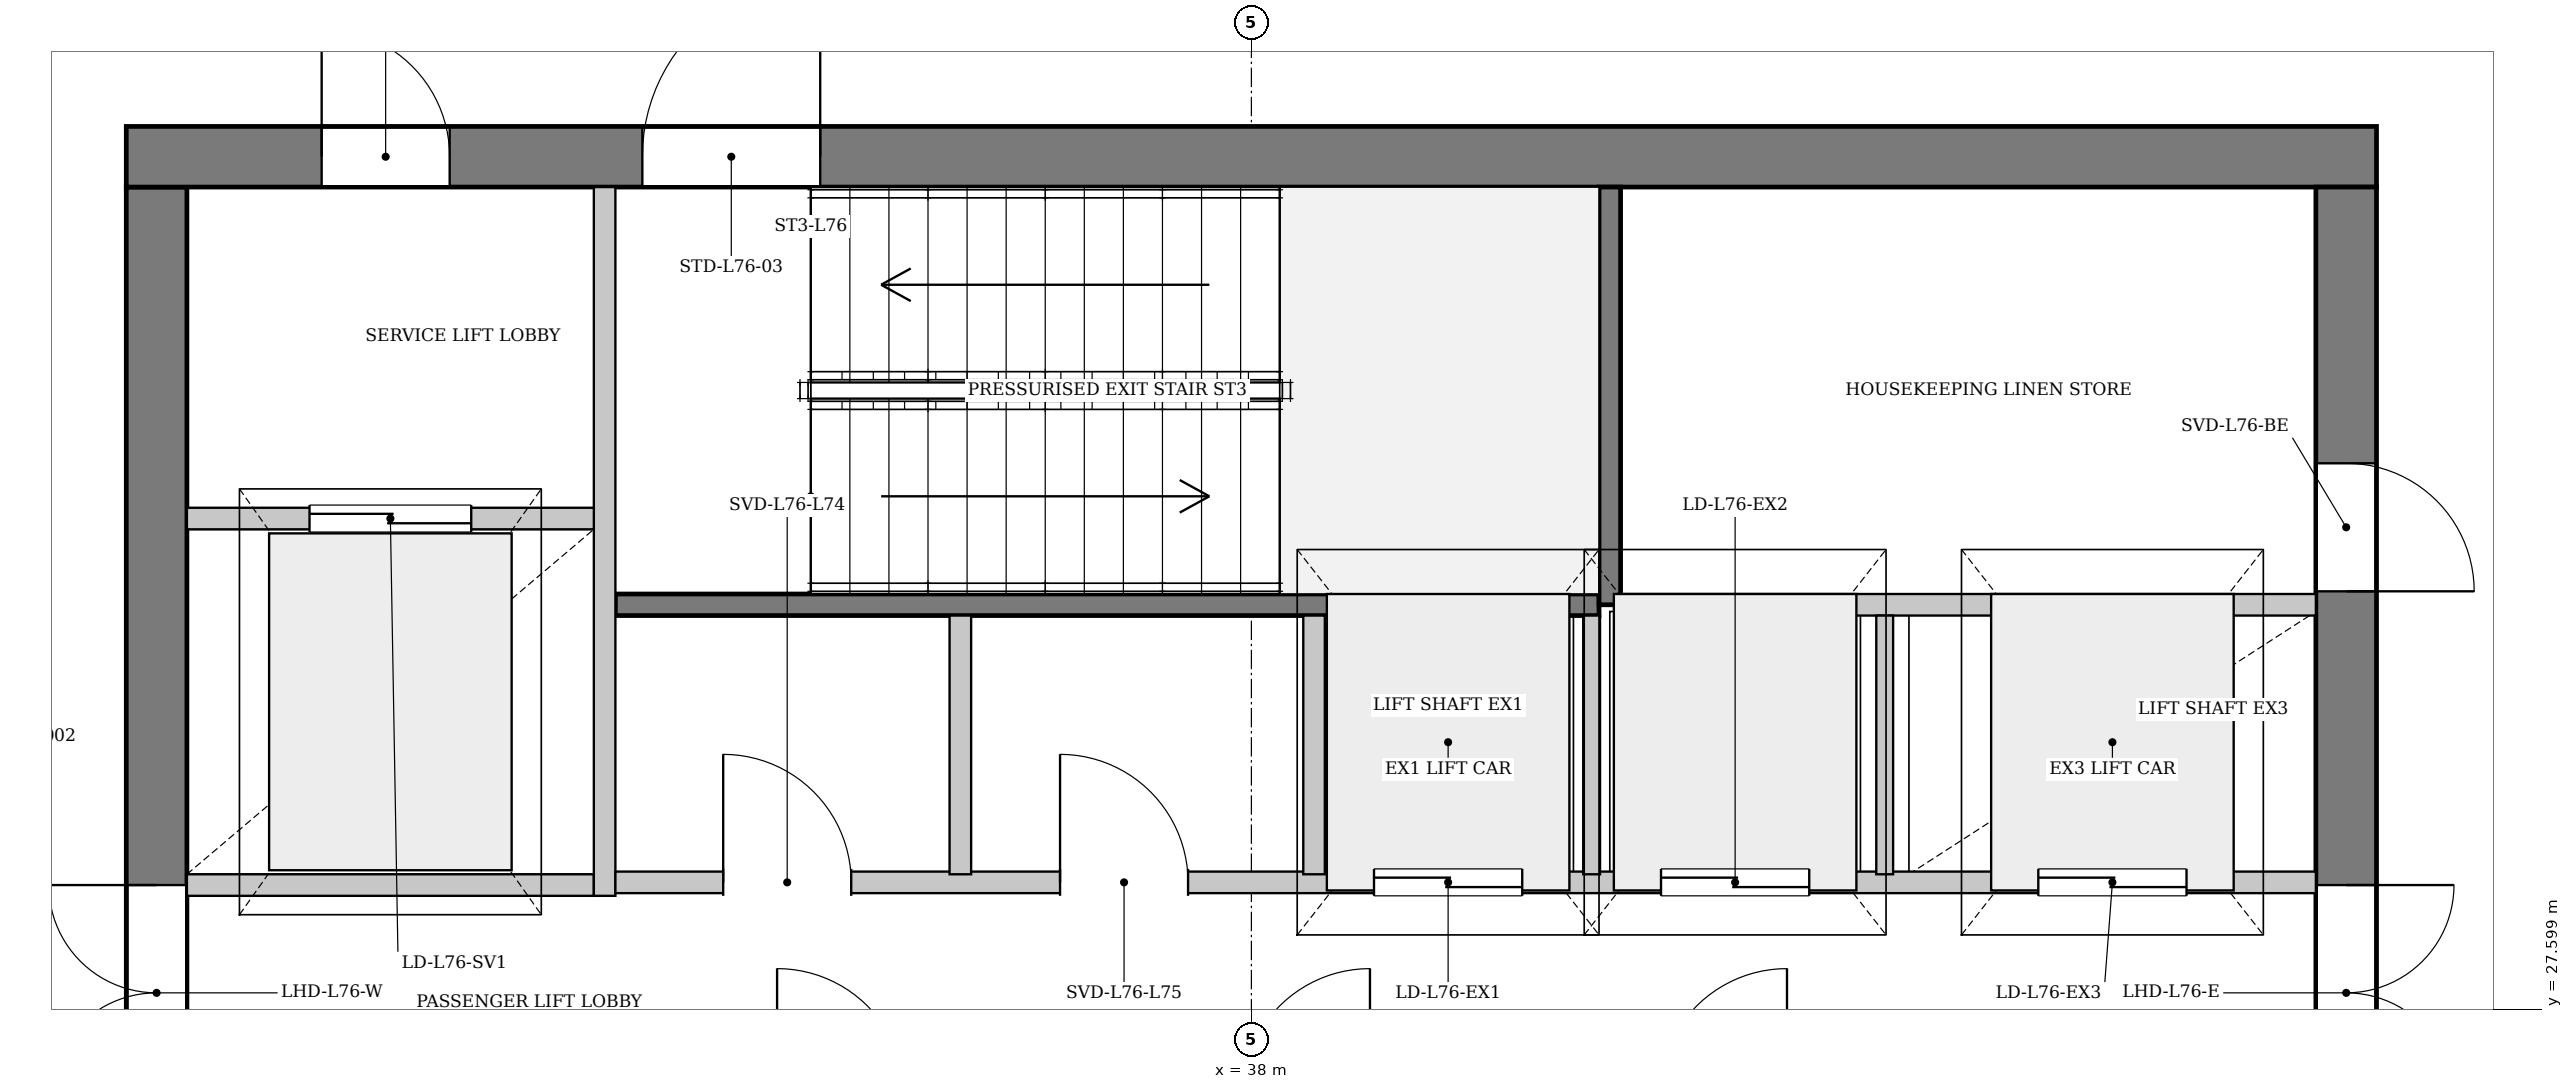
"""IFC4 building model, lengths in metres.
Left out: names, types, materials, properties, quantities, classifications, styles, units other than length and angle.
Written with IfcOpenShell. Run it as: python <this file> out.ifc"""

import sys

from ifc_helpers import new_model, si_unit, direction, frame, frame_2d, origin, place, context, subcontext, project, spatial, rectangle, extrude, source, transform, mapped, element, fill, save


model = new_model("IFC4")
c1 = context("Model", 3, precision=1e-05, world=origin(), true_north=direction((0.0, 1.0)))
c2 = subcontext(c1, "Body", "Model", "MODEL_VIEW")
j1 = project(units=[si_unit("LENGTHUNIT", "METRE"), si_unit("PLANEANGLEUNIT", "RADIAN")], contexts=[c1])
p1 = place(None, origin())
s1 = spatial("IfcSite", under=j1, at=p1, CompositionType="ELEMENT")
p2 = place(p1, origin())
s2 = spatial("IfcBuilding", under=s1, at=p2, CompositionType="ELEMENT")
p3 = place(p2, frame((0.0, 0.0, 286.1)))
s3 = spatial("IfcBuildingStorey", under=s2, at=p3, CompositionType="ELEMENT", Elevation=286.1)
p4 = place(p3, frame((29.875, 19.5, 0.0), z_axis=(0.0, 0.0, 1.0), x_axis=(0.0, 1.0, 0.0)))
e1 = element("IfcWall", 1, at=p4, inside=s3, PredefinedType="SHEAR", context=c2, shape_type="SweptSolid", body=[
    extrude(rectangle(XDim=14.2, YDim=0.45, at=frame_2d((7.1, 0.0))), origin(), (0.0, 0.0, 1.0), 4.12),
])
p5 = place(p4, frame((7.42, 0.0, 0.0)))
e2 = element("IfcOpeningElement", 2, at=p5, cuts=e1, PredefinedType="OPENING", context=c2, shape_type="SweptSolid", body=[
    extrude(rectangle(XDim=1.6, YDim=2.2, at=frame_2d((0.8, 1.1))), frame((0.0, 0.235, 0.0), z_axis=(0.0, -1.0, 0.0), x_axis=(1.0, 0.0, 0.0)), (0.0, 0.0, 1.0), 0.47),
])
p6 = place(p3, frame((29.65, 33.925, 0.0), z_axis=(0.0, 0.0, 1.0), x_axis=(1.0, 0.0, 0.0)))
e3 = element("IfcWall", 3, at=p6, inside=s3, PredefinedType="SHEAR", context=c2, shape_type="SweptSolid", body=[
    extrude(rectangle(XDim=16.7, YDim=0.45, at=frame_2d((8.35, 0.0))), origin(), (0.0, 0.0, 1.0), 4.12),
])
p7 = place(p6, frame((1.45, 0.0, 0.0)))
e4 = element("IfcOpeningElement", 4, at=p7, cuts=e3, PredefinedType="OPENING", context=c2, shape_type="SweptSolid", body=[
    extrude(rectangle(XDim=0.95, YDim=2.1, at=frame_2d((0.475, 1.05))), frame((0.0, 0.235, 0.0), z_axis=(0.0, -1.0, 0.0), x_axis=(1.0, 0.0, 0.0)), (0.0, 0.0, 1.0), 0.47),
])
p8 = place(p6, frame((3.83, 0.0, 0.0)))
e5 = element("IfcOpeningElement", 5, at=p8, cuts=e3, PredefinedType="OPENING", context=c2, shape_type="SweptSolid", body=[
    extrude(rectangle(XDim=1.32, YDim=2.2, at=frame_2d((0.66, 1.1))), frame((0.0, 0.235, 0.0), z_axis=(0.0, -1.0, 0.0), x_axis=(1.0, 0.0, 0.0)), (0.0, 0.0, 1.0), 0.47),
])
p9 = place(p3, frame((46.125, 33.7, 0.0), z_axis=(0.0, 0.0, 1.0), x_axis=(0.0, -1.0, 0.0)))
e6 = element("IfcWall", 6, at=p9, inside=s3, PredefinedType="SHEAR", context=c2, shape_type="SweptSolid", body=[
    extrude(rectangle(XDim=14.2, YDim=0.45, at=frame_2d((7.1, 0.0))), origin(), (0.0, 0.0, 1.0), 4.12),
])
p10 = place(p9, frame((5.18, 0.0, 0.0)))
e7 = element("IfcOpeningElement", 7, at=p10, cuts=e6, PredefinedType="OPENING", context=c2, shape_type="SweptSolid", body=[
    extrude(rectangle(XDim=1.6, YDim=2.2, at=frame_2d((0.8, 1.1))), frame((0.0, 0.235, 0.0), z_axis=(0.0, -1.0, 0.0), x_axis=(1.0, 0.0, 0.0)), (0.0, 0.0, 1.0), 0.47),
])
p11 = place(p9, frame((2.05, 0.0, 0.0)))
e8 = element("IfcOpeningElement", 8, at=p11, cuts=e6, PredefinedType="OPENING", context=c2, shape_type="SweptSolid", body=[
    extrude(rectangle(XDim=0.95, YDim=2.1, at=frame_2d((0.475, 1.05))), frame((0.0, 0.235, 0.0), z_axis=(0.0, -1.0, 0.0), x_axis=(1.0, 0.0, 0.0)), (0.0, 0.0, 1.0), 0.47),
])
p12 = place(p3, frame((33.28, 30.6, 0.0), z_axis=(0.0, 0.0, 1.0), x_axis=(1.0, 0.0, 0.0)))
e9 = element("IfcWall", 9, at=p12, inside=s3, PredefinedType="PARTITIONING", context=c2, shape_type="SweptSolid", body=[
    extrude(rectangle(XDim=7.3, YDim=0.16, at=frame_2d((3.65, 0.0))), origin(), (0.0, 0.0, 1.0), 4.12),
])
p13 = place(p3, frame((40.66, 30.6, 0.0), z_axis=(0.0, 0.0, 1.0), x_axis=(0.0, 1.0, 0.0)))
e10 = element("IfcWall", 10, at=p13, inside=s3, PredefinedType="PARTITIONING", context=c2, shape_type="SweptSolid", body=[
    extrude(rectangle(XDim=3.1, YDim=0.16, at=frame_2d((1.55, 0.0))), origin(), (0.0, 0.0, 1.0), 4.12),
])
p14 = place(p3, frame((30.1, 28.52, 0.0), z_axis=(0.0, 0.0, 1.0), x_axis=(1.0, 0.0, 0.0)))
e11 = element("IfcWall", 11, at=p14, inside=s3, PredefinedType="PARTITIONING", context=c2, shape_type="SweptSolid", body=[
    extrude(rectangle(XDim=3.02, YDim=0.16, at=frame_2d((1.51, 0.0))), origin(), (0.0, 0.0, 1.0), 4.12),
])
p15 = place(p3, frame((33.2, 28.44, 0.0), z_axis=(0.0, 0.0, 1.0), x_axis=(0.0, 1.0, 0.0)))
e12 = element("IfcWall", 12, at=p15, inside=s3, PredefinedType="PARTITIONING", context=c2, shape_type="SweptSolid", body=[
    extrude(rectangle(XDim=5.26, YDim=0.16, at=frame_2d((2.63, 0.0))), origin(), (0.0, 0.0, 1.0), 4.12),
])
p16 = place(p3, frame((30.1, 31.24, 0.0), z_axis=(0.0, 0.0, 1.0), x_axis=(1.0, 0.0, 0.0)))
e13 = element("IfcWall", 13, at=p16, inside=s3, PredefinedType="PARTITIONING", context=c2, shape_type="SweptSolid", body=[
    extrude(rectangle(XDim=3.02, YDim=0.16, at=frame_2d((1.51, 0.0))), origin(), (0.0, 0.0, 1.0), 4.12),
])
p17 = place(p16, frame((0.91, 0.0, 0.0)))
e14 = element("IfcOpeningElement", 14, at=p17, cuts=e13, PredefinedType="OPENING", context=c2, shape_type="SweptSolid", body=[
    extrude(rectangle(XDim=1.2, YDim=2.2, at=frame_2d((0.6, 1.1))), frame((0.0, 0.09, 0.0), z_axis=(0.0, -1.0, 0.0), x_axis=(1.0, 0.0, 0.0)), (0.0, 0.0, 1.0), 0.18),
])
p18 = place(p3, frame((33.28, 28.54, 0.0), z_axis=(0.0, 0.0, 1.0), x_axis=(1.0, 0.0, 0.0)))
e15 = element("IfcWall", 15, at=p18, inside=s3, PredefinedType="PARTITIONING", context=c2, shape_type="SweptSolid", body=[
    extrude(rectangle(XDim=12.62, YDim=0.16, at=frame_2d((6.31, 0.0))), origin(), (0.0, 0.0, 1.0), 4.12),
])
p19 = place(p18, frame((0.8, 0.0, 0.0)))
e16 = element("IfcOpeningElement", 16, at=p19, cuts=e15, PredefinedType="OPENING", context=c2, shape_type="SweptSolid", body=[
    extrude(rectangle(XDim=0.95, YDim=2.1, at=frame_2d((0.475, 1.05))), frame((0.0, 0.09, 0.0), z_axis=(0.0, -1.0, 0.0), x_axis=(1.0, 0.0, 0.0)), (0.0, 0.0, 1.0), 0.18),
])
p20 = place(p18, frame((3.3, 0.0, 0.0)))
e17 = element("IfcOpeningElement", 17, at=p20, cuts=e15, PredefinedType="OPENING", context=c2, shape_type="SweptSolid", body=[
    extrude(rectangle(XDim=0.95, YDim=2.1, at=frame_2d((0.475, 1.05))), frame((0.0, 0.09, 0.0), z_axis=(0.0, -1.0, 0.0), x_axis=(1.0, 0.0, 0.0)), (0.0, 0.0, 1.0), 0.18),
])
p21 = place(p18, frame((5.63, 0.0, 0.0)))
e18 = element("IfcOpeningElement", 18, at=p21, cuts=e15, PredefinedType="OPENING", context=c2, shape_type="SweptSolid", body=[
    extrude(rectangle(XDim=1.1, YDim=2.2, at=frame_2d((0.55, 1.1))), frame((0.0, 0.09, 0.0), z_axis=(0.0, -1.0, 0.0), x_axis=(1.0, 0.0, 0.0)), (0.0, 0.0, 1.0), 0.18),
])
p22 = place(p18, frame((7.76, 0.0, 0.0)))
e19 = element("IfcOpeningElement", 19, at=p22, cuts=e15, PredefinedType="OPENING", context=c2, shape_type="SweptSolid", body=[
    extrude(rectangle(XDim=1.1, YDim=2.2, at=frame_2d((0.55, 1.1))), frame((0.0, 0.09, 0.0), z_axis=(0.0, -1.0, 0.0), x_axis=(1.0, 0.0, 0.0)), (0.0, 0.0, 1.0), 0.18),
])
p23 = place(p18, frame((10.56, 0.0, 0.0)))
e20 = element("IfcOpeningElement", 20, at=p23, cuts=e15, PredefinedType="OPENING", context=c2, shape_type="SweptSolid", body=[
    extrude(rectangle(XDim=1.1, YDim=2.2, at=frame_2d((0.55, 1.1))), frame((0.0, 0.09, 0.0), z_axis=(0.0, -1.0, 0.0), x_axis=(1.0, 0.0, 0.0)), (0.0, 0.0, 1.0), 0.18),
])
p24 = place(p3, frame((40.72, 30.6, 0.0), z_axis=(0.0, 0.0, 1.0), x_axis=(1.0, 0.0, 0.0)))
e21 = element("IfcWall", 21, at=p24, inside=s3, PredefinedType="PARTITIONING", context=c2, shape_type="SweptSolid", body=[
    extrude(rectangle(XDim=5.18, YDim=0.16, at=frame_2d((2.59, 0.0))), origin(), (0.0, 0.0, 1.0), 4.12),
])
for number, where, z_axis, x_axis in (
    (22, (35.84, 28.6, 0.0), (0.0, 0.0, 1.0), (0.0, 1.0, 0.0)),
    (23, (38.465, 28.6, 0.0), (0.0, 0.0, 1.0), (0.0, 1.0, 0.0)),
):
    element("IfcWall", number, at=place(p3, frame(where, z_axis=z_axis, x_axis=x_axis)), inside=s3, PredefinedType="PARTITIONING", context=c2, shape_type="SweptSolid", body=[
        extrude(rectangle(XDim=1.92, YDim=0.16, at=frame_2d((0.96, 0.0))), origin(), (0.0, 0.0, 1.0), 4.12),
    ])
for number, where, z_axis, x_axis in (
    (24, (40.525, 28.6, 0.0), (0.0, 0.0, 1.0), (0.0, 1.0, 0.0)),
    (25, (42.7, 28.6, 0.0), (0.0, 0.0, 1.0), (0.0, 1.0, 0.0)),
):
    element("IfcWall", number, at=place(p3, frame(where, z_axis=z_axis, x_axis=x_axis)), inside=s3, PredefinedType="PARTITIONING", context=c2, shape_type="SweptSolid", body=[
        extrude(rectangle(XDim=1.92, YDim=0.125, at=frame_2d((0.96, 0.0))), origin(), (0.0, 0.0, 1.0), 4.12),
    ])
m1 = source(origin(), c2, "Body", "SweptSolid", [
    extrude(rectangle(XDim=1.6, YDim=2.2, at=frame_2d((0.8, 1.1))), frame((0.0, 0.025, 0.0), z_axis=(0.0, -1.0, 0.0), x_axis=(1.0, 0.0, 0.0)), (0.0, 0.0, 1.0), 0.05),
])
p25 = place(p5, origin())
e26 = element("IfcDoor", 26, at=p25, inside=s3, OperationType="DOUBLE_DOOR_SINGLE_SWING", PredefinedType="DOOR", context=c2, shape_type="MappedRepresentation", body=[
    mapped(m1, transform((0.0, 0.0, 0.0), x_axis=(1.0, 0.0, 0.0), y_axis=(0.0, 1.0, 0.0), z_axis=(0.0, 0.0, 1.0), scale=1.0)),
])
fill(e2, e26)
m2 = source(origin(), c2, "Body", "SweptSolid", [
    extrude(rectangle(XDim=0.95, YDim=2.1, at=frame_2d((0.475, 1.05))), frame((0.0, 0.025, 0.0), z_axis=(0.0, -1.0, 0.0), x_axis=(1.0, 0.0, 0.0)), (0.0, 0.0, 1.0), 0.05),
])
p26 = place(p7, origin())
e27 = element("IfcDoor", 27, at=p26, inside=s3, OperationType="SINGLE_SWING_LEFT", PredefinedType="DOOR", context=c2, shape_type="MappedRepresentation", body=[
    mapped(m2, transform((0.0, 0.0, 0.0), x_axis=(1.0, 0.0, 0.0), y_axis=(0.0, 1.0, 0.0), z_axis=(0.0, 0.0, 1.0), scale=1.0)),
])
fill(e4, e27)
m3 = source(origin(), c2, "Body", "SweptSolid", [
    extrude(rectangle(XDim=1.32, YDim=2.2, at=frame_2d((0.66, 1.1))), frame((0.0, 0.025, 0.0), z_axis=(0.0, -1.0, 0.0), x_axis=(1.0, 0.0, 0.0)), (0.0, 0.0, 1.0), 0.05),
])
p27 = place(p8, origin())
e28 = element("IfcDoor", 28, at=p27, inside=s3, OperationType="SINGLE_SWING_RIGHT", PredefinedType="DOOR", context=c2, shape_type="MappedRepresentation", body=[
    mapped(m3, transform((0.0, 0.0, 0.0), x_axis=(1.0, 0.0, 0.0), y_axis=(0.0, 1.0, 0.0), z_axis=(0.0, 0.0, 1.0), scale=1.0)),
])
fill(e5, e28)
p28 = place(p10, origin())
e29 = element("IfcDoor", 29, at=p28, inside=s3, OperationType="DOUBLE_DOOR_SINGLE_SWING", PredefinedType="DOOR", context=c2, shape_type="MappedRepresentation", body=[
    mapped(m1, transform((0.0, 0.0, 0.0), x_axis=(1.0, 0.0, 0.0), y_axis=(0.0, 1.0, 0.0), z_axis=(0.0, 0.0, 1.0), scale=1.0)),
])
fill(e7, e29)
m4 = source(origin(), c2, "Body", "SweptSolid", [
    extrude(rectangle(XDim=1.2, YDim=2.2, at=frame_2d((0.6, 1.1))), frame((0.0, 0.025, 0.0), z_axis=(0.0, -1.0, 0.0), x_axis=(1.0, 0.0, 0.0)), (0.0, 0.0, 1.0), 0.05),
])
p29 = place(p17, origin())
e30 = element("IfcDoor", 30, at=p29, inside=s3, OperationType="DOUBLE_DOOR_SLIDING", PredefinedType="DOOR", context=c2, shape_type="MappedRepresentation", body=[
    mapped(m4, transform((0.0, 0.0, 0.0), x_axis=(1.0, 0.0, 0.0), y_axis=(0.0, 1.0, 0.0), z_axis=(0.0, 0.0, 1.0), scale=1.0)),
])
fill(e14, e30)
p30 = place(p19, origin())
e31 = element("IfcDoor", 31, at=p30, inside=s3, OperationType="SINGLE_SWING_LEFT", PredefinedType="DOOR", context=c2, shape_type="MappedRepresentation", body=[
    mapped(m2, transform((0.0, 0.0, 0.0), x_axis=(1.0, 0.0, 0.0), y_axis=(0.0, 1.0, 0.0), z_axis=(0.0, 0.0, 1.0), scale=1.0)),
])
fill(e16, e31)
p31 = place(p20, origin())
e32 = element("IfcDoor", 32, at=p31, inside=s3, OperationType="SINGLE_SWING_LEFT", PredefinedType="DOOR", context=c2, shape_type="MappedRepresentation", body=[
    mapped(m2, transform((0.0, 0.0, 0.0), x_axis=(1.0, 0.0, 0.0), y_axis=(0.0, 1.0, 0.0), z_axis=(0.0, 0.0, 1.0), scale=1.0)),
])
fill(e17, e32)
m5 = source(origin(), c2, "Body", "SweptSolid", [
    extrude(rectangle(XDim=1.1, YDim=2.2, at=frame_2d((0.55, 1.1))), frame((0.0, 0.025, 0.0), z_axis=(0.0, -1.0, 0.0), x_axis=(1.0, 0.0, 0.0)), (0.0, 0.0, 1.0), 0.05),
])
p32 = place(p21, origin())
e33 = element("IfcDoor", 33, at=p32, inside=s3, OperationType="DOUBLE_DOOR_SLIDING", PredefinedType="DOOR", context=c2, shape_type="MappedRepresentation", body=[
    mapped(m5, transform((0.0, 0.0, 0.0), x_axis=(1.0, 0.0, 0.0), y_axis=(0.0, 1.0, 0.0), z_axis=(0.0, 0.0, 1.0), scale=1.0)),
])
fill(e18, e33)
p33 = place(p22, origin())
e34 = element("IfcDoor", 34, at=p33, inside=s3, OperationType="DOUBLE_DOOR_SLIDING", PredefinedType="DOOR", context=c2, shape_type="MappedRepresentation", body=[
    mapped(m5, transform((0.0, 0.0, 0.0), x_axis=(1.0, 0.0, 0.0), y_axis=(0.0, 1.0, 0.0), z_axis=(0.0, 0.0, 1.0), scale=1.0)),
])
fill(e19, e34)
p34 = place(p23, origin())
e35 = element("IfcDoor", 35, at=p34, inside=s3, OperationType="DOUBLE_DOOR_SLIDING", PredefinedType="DOOR", context=c2, shape_type="MappedRepresentation", body=[
    mapped(m5, transform((0.0, 0.0, 0.0), x_axis=(1.0, 0.0, 0.0), y_axis=(0.0, 1.0, 0.0), z_axis=(0.0, 0.0, 1.0), scale=1.0)),
])
fill(e20, e35)
p35 = place(p11, origin())
e36 = element("IfcDoor", 36, at=p35, inside=s3, OperationType="SINGLE_SWING_RIGHT", PredefinedType="DOOR", context=c2, shape_type="MappedRepresentation", body=[
    mapped(m2, transform((0.0, 0.0, 0.0), x_axis=(1.0, 0.0, 0.0), y_axis=(0.0, 1.0, 0.0), z_axis=(0.0, 0.0, 1.0), scale=1.0)),
])
fill(e8, e36)
save(model, sys.argv[1])
